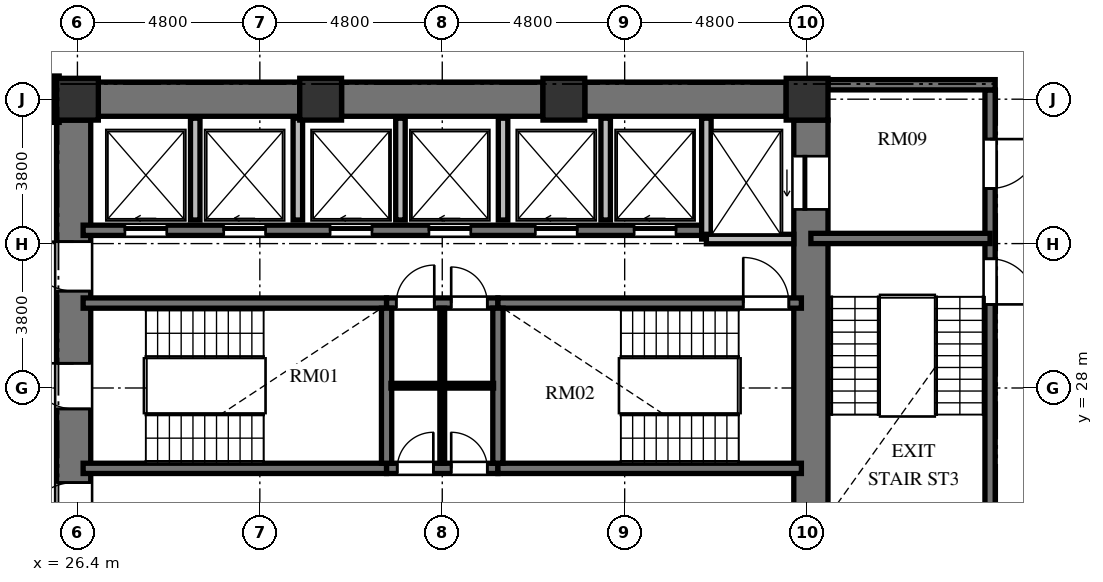
"""IFC4 building model, lengths in metres.
Left out: names, types, materials, properties, quantities, classifications, styles, units other than length and angle.
Written with IfcOpenShell. Run it as: python <this file> out.ifc"""

import sys

from ifc_helpers import new_model, si_unit, direction, frame, frame_2d, origin, origin_2d, place, context, subcontext, project, spatial, rectangle, extrude, element, fill, save


model = new_model("IFC4")
c1 = context("Model", 3, precision=1e-05, world=origin(), true_north=direction((0.0, 1.0)))
c2 = subcontext(c1, "Body", "Model", "MODEL_VIEW")
j1 = project(units=[si_unit("LENGTHUNIT", "METRE"), si_unit("PLANEANGLEUNIT", "RADIAN")], contexts=[c1])
p1 = place(None, origin())
s1 = spatial("IfcSite", under=j1, at=p1, CompositionType="ELEMENT")
p2 = place(p1, origin())
s2 = spatial("IfcBuilding", under=s1, at=p2, CompositionType="ELEMENT")
p3 = place(p2, frame((0.0, 0.0, 43.44)))
s3 = spatial("IfcBuildingStorey", under=s2, at=p3, CompositionType="ELEMENT", Elevation=43.44)
for number, where, z_axis, x_axis in (
    (1, (45.6, 35.6, 0.0), (0.0, 0.0, 1.0), (1.0, 0.0, 0.0)),
    (2, (39.2, 35.6, 0.0), (0.0, 0.0, 1.0), (1.0, 0.0, 0.0)),
    (3, (32.8, 35.6, 0.0), (0.0, 0.0, 1.0), (1.0, 0.0, 0.0)),
    (4, (26.4, 35.6, 0.0), (0.0, 0.0, 1.0), (1.0, 0.0, 0.0)),
):
    element("IfcColumn", number, at=place(p3, frame(where, z_axis=z_axis, x_axis=x_axis)), inside=s3, PredefinedType="COLUMN", context=c2, shape_type="SweptSolid", body=[
        extrude(rectangle(XDim=1.1, YDim=1.1, at=origin_2d()), origin(), (0.0, 0.0, 1.0), 3.648),
    ])
p4 = place(p3, frame((26.3, 20.95, 0.0), z_axis=(0.0, 0.0, 1.0), x_axis=(0.0, 1.0, 0.0)))
e5 = element("IfcWall", 5, at=p4, inside=s3, PredefinedType="SHEAR", context=c2, shape_type="SweptSolid", body=[
    extrude(rectangle(XDim=14.1, YDim=0.9, at=frame_2d((7.05, 0.0))), origin(), (0.0, 0.0, 1.0), 3.648),
])
p5 = place(p4, frame((6.5, 0.0, 0.0)))
e6 = element("IfcOpeningElement", 6, at=p5, cuts=e5, PredefinedType="OPENING", context=c2, shape_type="SweptSolid", body=[
    extrude(rectangle(XDim=1.2, YDim=2.15, at=frame_2d((0.6, 1.075))), frame((0.0, 0.46, 0.0), z_axis=(0.0, -1.0, 0.0), x_axis=(1.0, 0.0, 0.0)), (0.0, 0.0, 1.0), 0.92),
])
p6 = place(p4, frame((9.6, 0.0, 0.0)))
e7 = element("IfcOpeningElement", 7, at=p6, cuts=e5, PredefinedType="OPENING", context=c2, shape_type="SweptSolid", body=[
    extrude(rectangle(XDim=1.3, YDim=2.2, at=frame_2d((0.65, 1.1))), frame((0.0, 0.46, 0.0), z_axis=(0.0, -1.0, 0.0), x_axis=(1.0, 0.0, 0.0)), (0.0, 0.0, 1.0), 0.92),
])
p7 = place(p4, frame((3.26, 0.0, 0.0)))
e8 = element("IfcOpeningElement", 8, at=p7, cuts=e5, PredefinedType="OPENING", context=c2, shape_type="SweptSolid", body=[
    extrude(rectangle(XDim=1.3, YDim=2.2, at=frame_2d((0.65, 1.1))), frame((0.0, 0.46, 0.0), z_axis=(0.0, -1.0, 0.0), x_axis=(1.0, 0.0, 0.0)), (0.0, 0.0, 1.0), 0.92),
])
p8 = place(p3, frame((45.7, 20.95, 0.0), z_axis=(0.0, 0.0, 1.0), x_axis=(0.0, 1.0, 0.0)))
e9 = element("IfcWall", 9, at=p8, inside=s3, PredefinedType="SHEAR", context=c2, shape_type="SweptSolid", body=[
    extrude(rectangle(XDim=14.1, YDim=0.9, at=frame_2d((7.05, 0.0))), origin(), (0.0, 0.0, 1.0), 3.648),
])
p9 = place(p8, frame((11.75, 0.0, 0.0)))
e10 = element("IfcOpeningElement", 10, at=p9, cuts=e9, PredefinedType="OPENING", context=c2, shape_type="SweptSolid", body=[
    extrude(rectangle(XDim=1.4, YDim=2.3, at=frame_2d((0.7, 1.15))), frame((0.0, 0.46, 0.0), z_axis=(0.0, -1.0, 0.0), x_axis=(1.0, 0.0, 0.0)), (0.0, 0.0, 1.0), 0.92),
])
p10 = place(p8, frame((0.95, 0.0, 0.0)))
e11 = element("IfcOpeningElement", 11, at=p10, cuts=e9, PredefinedType="OPENING", context=c2, shape_type="SweptSolid", body=[
    extrude(rectangle(XDim=1.4, YDim=2.3, at=frame_2d((0.7, 1.15))), frame((0.0, 0.46, 0.0), z_axis=(0.0, -1.0, 0.0), x_axis=(1.0, 0.0, 0.0)), (0.0, 0.0, 1.0), 0.92),
])
p11 = place(p3, frame((26.95, 35.6, 0.0), z_axis=(0.0, 0.0, 1.0), x_axis=(1.0, 0.0, 0.0)))
e12 = element("IfcWall", 12, at=p11, inside=s3, PredefinedType="SHEAR", context=c2, shape_type="SweptSolid", body=[
    extrude(rectangle(XDim=5.3, YDim=0.9, at=frame_2d((2.65, 0.0))), origin(), (0.0, 0.0, 1.0), 3.648),
])
p12 = place(p3, frame((33.35, 35.6, 0.0), z_axis=(0.0, 0.0, 1.0), x_axis=(1.0, 0.0, 0.0)))
e13 = element("IfcWall", 13, at=p12, inside=s3, PredefinedType="SHEAR", context=c2, shape_type="SweptSolid", body=[
    extrude(rectangle(XDim=5.3, YDim=0.9, at=frame_2d((2.65, 0.0))), origin(), (0.0, 0.0, 1.0), 3.648),
])
p13 = place(p3, frame((39.75, 35.6, 0.0), z_axis=(0.0, 0.0, 1.0), x_axis=(1.0, 0.0, 0.0)))
e14 = element("IfcWall", 14, at=p13, inside=s3, PredefinedType="SHEAR", context=c2, shape_type="SweptSolid", body=[
    extrude(rectangle(XDim=5.3, YDim=0.9, at=frame_2d((2.65, 0.0))), origin(), (0.0, 0.0, 1.0), 3.648),
])
p14 = place(p3, frame((26.55, 30.235, 0.0), z_axis=(0.0, 0.0, 1.0), x_axis=(1.0, 0.0, 0.0)))
e15 = element("IfcWall", 15, at=p14, inside=s3, PredefinedType="SHEAR", context=c2, shape_type="SweptSolid", body=[
    extrude(rectangle(XDim=7.985, YDim=0.27, at=frame_2d((3.992, 0.0))), origin(), (0.0, 0.0, 1.0), 3.648),
])
p15 = place(p3, frame((34.535, 30.235, 0.0), z_axis=(0.0, 0.0, 1.0), x_axis=(1.0, 0.0, 0.0)))
e16 = element("IfcWall", 16, at=p15, inside=s3, PredefinedType="SHEAR", context=c2, shape_type="SweptSolid", body=[
    extrude(rectangle(XDim=2.93, YDim=0.27, at=frame_2d((1.465, 0.0))), origin(), (0.0, 0.0, 1.0), 3.648),
])
p16 = place(p15, frame((0.255, 0.0, 0.0)))
e17 = element("IfcOpeningElement", 17, at=p16, cuts=e16, PredefinedType="OPENING", context=c2, shape_type="SweptSolid", body=[
    extrude(rectangle(XDim=1.0, YDim=2.1, at=frame_2d((0.5, 1.05))), frame((0.0, 0.145, 0.0), z_axis=(0.0, -1.0, 0.0), x_axis=(1.0, 0.0, 0.0)), (0.0, 0.0, 1.0), 0.29),
])
p17 = place(p15, frame((1.7, 0.0, 0.0)))
e18 = element("IfcOpeningElement", 18, at=p17, cuts=e16, PredefinedType="OPENING", context=c2, shape_type="SweptSolid", body=[
    extrude(rectangle(XDim=0.95, YDim=2.1, at=frame_2d((0.475, 1.05))), frame((0.0, 0.145, 0.0), z_axis=(0.0, -1.0, 0.0), x_axis=(1.0, 0.0, 0.0)), (0.0, 0.0, 1.0), 0.29),
])
p18 = place(p3, frame((37.465, 30.235, 0.0), z_axis=(0.0, 0.0, 1.0), x_axis=(1.0, 0.0, 0.0)))
e19 = element("IfcWall", 19, at=p18, inside=s3, PredefinedType="SHEAR", context=c2, shape_type="SweptSolid", body=[
    extrude(rectangle(XDim=7.985, YDim=0.27, at=frame_2d((3.992, 0.0))), origin(), (0.0, 0.0, 1.0), 3.648),
])
p19 = place(p18, frame((6.455, 0.0, 0.0)))
e20 = element("IfcOpeningElement", 20, at=p19, cuts=e19, PredefinedType="OPENING", context=c2, shape_type="SweptSolid", body=[
    extrude(rectangle(XDim=1.2, YDim=2.15, at=frame_2d((0.6, 1.075))), frame((0.0, 0.145, 0.0), z_axis=(0.0, -1.0, 0.0), x_axis=(1.0, 0.0, 0.0)), (0.0, 0.0, 1.0), 0.29),
])
p20 = place(p3, frame((26.55, 25.885, 0.0), z_axis=(0.0, 0.0, 1.0), x_axis=(1.0, 0.0, 0.0)))
e21 = element("IfcWall", 21, at=p20, inside=s3, PredefinedType="SHEAR", context=c2, shape_type="SweptSolid", body=[
    extrude(rectangle(XDim=7.985, YDim=0.27, at=frame_2d((3.992, 0.0))), origin(), (0.0, 0.0, 1.0), 3.648),
])
p21 = place(p3, frame((34.535, 25.885, 0.0), z_axis=(0.0, 0.0, 1.0), x_axis=(1.0, 0.0, 0.0)))
e22 = element("IfcWall", 22, at=p21, inside=s3, PredefinedType="SHEAR", context=c2, shape_type="SweptSolid", body=[
    extrude(rectangle(XDim=2.93, YDim=0.27, at=frame_2d((1.465, 0.0))), origin(), (0.0, 0.0, 1.0), 3.648),
])
p22 = place(p21, frame((0.28, 0.0, 0.0)))
e23 = element("IfcOpeningElement", 23, at=p22, cuts=e22, PredefinedType="OPENING", context=c2, shape_type="SweptSolid", body=[
    extrude(rectangle(XDim=0.95, YDim=2.1, at=frame_2d((0.475, 1.05))), frame((0.0, 0.145, 0.0), z_axis=(0.0, -1.0, 0.0), x_axis=(1.0, 0.0, 0.0)), (0.0, 0.0, 1.0), 0.29),
])
p23 = place(p21, frame((1.7, 0.0, 0.0)))
e24 = element("IfcOpeningElement", 24, at=p23, cuts=e22, PredefinedType="OPENING", context=c2, shape_type="SweptSolid", body=[
    extrude(rectangle(XDim=0.95, YDim=2.1, at=frame_2d((0.475, 1.05))), frame((0.0, 0.145, 0.0), z_axis=(0.0, -1.0, 0.0), x_axis=(1.0, 0.0, 0.0)), (0.0, 0.0, 1.0), 0.29),
])
p24 = place(p3, frame((37.465, 25.885, 0.0), z_axis=(0.0, 0.0, 1.0), x_axis=(1.0, 0.0, 0.0)))
e25 = element("IfcWall", 25, at=p24, inside=s3, PredefinedType="SHEAR", context=c2, shape_type="SweptSolid", body=[
    extrude(rectangle(XDim=7.985, YDim=0.27, at=frame_2d((3.992, 0.0))), origin(), (0.0, 0.0, 1.0), 3.648),
])
for number, where, z_axis, x_axis in (
    (26, (34.535, 26.02, 0.0), (0.0, 0.0, 1.0), (0.0, 1.0, 0.0)),
    (27, (37.465, 26.02, 0.0), (0.0, 0.0, 1.0), (0.0, 1.0, 0.0)),
):
    element("IfcWall", number, at=place(p3, frame(where, z_axis=z_axis, x_axis=x_axis)), inside=s3, PredefinedType="SHEAR", context=c2, shape_type="SweptSolid", body=[
        extrude(rectangle(XDim=4.08, YDim=0.27, at=frame_2d((2.04, 0.0))), origin(), (0.0, 0.0, 1.0), 3.648),
    ])
p25 = place(p3, frame((34.65, 28.06, 0.0), z_axis=(0.0, 0.0, 1.0), x_axis=(1.0, 0.0, 0.0)))
e28 = element("IfcWall", 28, at=p25, inside=s3, PredefinedType="PARTITIONING", context=c2, shape_type="SweptSolid", body=[
    extrude(rectangle(XDim=2.7, YDim=0.125, at=frame_2d((1.35, 0.0))), origin(), (0.0, 0.0, 1.0), 3.428),
])
p26 = place(p3, frame((36.0, 26.02, 0.0), z_axis=(0.0, 0.0, 1.0), x_axis=(0.0, 1.0, 0.0)))
e29 = element("IfcWall", 29, at=p26, inside=s3, PredefinedType="PARTITIONING", context=c2, shape_type="SweptSolid", body=[
    extrude(rectangle(XDim=4.08, YDim=0.125, at=frame_2d((2.04, 0.0))), origin(), (0.0, 0.0, 1.0), 3.428),
])
p27 = place(p3, frame((26.55, 32.15, 0.0), z_axis=(0.0, 0.0, 1.0), x_axis=(1.0, 0.0, 0.0)))
e30 = element("IfcWall", 30, at=p27, inside=s3, PredefinedType="SHEAR", context=c2, shape_type="SweptSolid", body=[
    extrude(rectangle(XDim=16.4, YDim=0.27, at=frame_2d((8.2, 0.0))), origin(), (0.0, 0.0, 1.0), 3.648),
])
p28 = place(p27, frame((1.1, 0.0, 0.0)))
e31 = element("IfcOpeningElement", 31, at=p28, cuts=e30, PredefinedType="OPENING", context=c2, shape_type="SweptSolid", body=[
    extrude(rectangle(XDim=1.1, YDim=2.2, at=frame_2d((0.55, 1.1))), frame((0.0, 0.145, 0.0), z_axis=(0.0, -1.0, 0.0), x_axis=(1.0, 0.0, 0.0)), (0.0, 0.0, 1.0), 0.29),
])
p29 = place(p27, frame((3.7, 0.0, 0.0)))
e32 = element("IfcOpeningElement", 32, at=p29, cuts=e30, PredefinedType="OPENING", context=c2, shape_type="SweptSolid", body=[
    extrude(rectangle(XDim=1.1, YDim=2.2, at=frame_2d((0.55, 1.1))), frame((0.0, 0.145, 0.0), z_axis=(0.0, -1.0, 0.0), x_axis=(1.0, 0.0, 0.0)), (0.0, 0.0, 1.0), 0.29),
])
p30 = place(p27, frame((6.5, 0.0, 0.0)))
e33 = element("IfcOpeningElement", 33, at=p30, cuts=e30, PredefinedType="OPENING", context=c2, shape_type="SweptSolid", body=[
    extrude(rectangle(XDim=1.1, YDim=2.2, at=frame_2d((0.55, 1.1))), frame((0.0, 0.145, 0.0), z_axis=(0.0, -1.0, 0.0), x_axis=(1.0, 0.0, 0.0)), (0.0, 0.0, 1.0), 0.29),
])
p31 = place(p27, frame((9.1, 0.0, 0.0)))
e34 = element("IfcOpeningElement", 34, at=p31, cuts=e30, PredefinedType="OPENING", context=c2, shape_type="SweptSolid", body=[
    extrude(rectangle(XDim=1.1, YDim=2.2, at=frame_2d((0.55, 1.1))), frame((0.0, 0.145, 0.0), z_axis=(0.0, -1.0, 0.0), x_axis=(1.0, 0.0, 0.0)), (0.0, 0.0, 1.0), 0.29),
])
p32 = place(p27, frame((11.9, 0.0, 0.0)))
e35 = element("IfcOpeningElement", 35, at=p32, cuts=e30, PredefinedType="OPENING", context=c2, shape_type="SweptSolid", body=[
    extrude(rectangle(XDim=1.1, YDim=2.2, at=frame_2d((0.55, 1.1))), frame((0.0, 0.145, 0.0), z_axis=(0.0, -1.0, 0.0), x_axis=(1.0, 0.0, 0.0)), (0.0, 0.0, 1.0), 0.29),
])
p33 = place(p27, frame((14.5, 0.0, 0.0)))
e36 = element("IfcOpeningElement", 36, at=p33, cuts=e30, PredefinedType="OPENING", context=c2, shape_type="SweptSolid", body=[
    extrude(rectangle(XDim=1.1, YDim=2.2, at=frame_2d((0.55, 1.1))), frame((0.0, 0.145, 0.0), z_axis=(0.0, -1.0, 0.0), x_axis=(1.0, 0.0, 0.0)), (0.0, 0.0, 1.0), 0.29),
])
p34 = place(p3, frame((42.95, 31.92, 0.0), z_axis=(0.0, 0.0, 1.0), x_axis=(0.0, 1.0, 0.0)))
e37 = element("IfcWall", 37, at=p34, inside=s3, PredefinedType="SOLIDWALL", context=c2, shape_type="SweptSolid", body=[
    extrude(rectangle(XDim=3.18, YDim=0.25, at=frame_2d((1.59, 0.0))), origin(), (0.0, 0.0, 1.0), 3.428),
])
p35 = place(p3, frame((42.95, 31.92, 0.0), z_axis=(0.0, 0.0, 1.0), x_axis=(1.0, 0.0, 0.0)))
e38 = element("IfcWall", 38, at=p35, inside=s3, PredefinedType="SOLIDWALL", context=c2, shape_type="SweptSolid", body=[
    extrude(rectangle(XDim=2.3, YDim=0.25, at=frame_2d((1.15, 0.0))), origin(), (0.0, 0.0, 1.0), 3.428),
])
for number, where, z_axis, x_axis in (
    (39, (29.5, 32.42, 0.0), (0.0, 0.0, 1.0), (0.0, 1.0, 0.0)),
    (40, (32.2, 32.42, 0.0), (0.0, 0.0, 1.0), (0.0, 1.0, 0.0)),
    (41, (34.9, 32.42, 0.0), (0.0, 0.0, 1.0), (0.0, 1.0, 0.0)),
    (42, (37.6, 32.42, 0.0), (0.0, 0.0, 1.0), (0.0, 1.0, 0.0)),
    (43, (40.3, 32.42, 0.0), (0.0, 0.0, 1.0), (0.0, 1.0, 0.0)),
):
    element("IfcWall", number, at=place(p3, frame(where, z_axis=z_axis, x_axis=x_axis)), inside=s3, PredefinedType="SOLIDWALL", context=c2, shape_type="SweptSolid", body=[
        extrude(rectangle(XDim=2.68, YDim=0.25, at=frame_2d((1.34, 0.0))), origin(), (0.0, 0.0, 1.0), 3.428),
    ])
p36 = place(p3, frame((50.415, 35.845, 0.0), z_axis=(0.0, 0.0, 1.0), x_axis=(0.0, -1.0, 0.0)))
e44 = element("IfcWall", 44, at=p36, inside=s3, PredefinedType="SHEAR", context=c2, shape_type="SweptSolid", body=[
    extrude(rectangle(XDim=15.825, YDim=0.27, at=frame_2d((7.913, 0.0))), origin(), (0.0, 0.0, 1.0), 3.648),
])
p37 = place(p36, frame((4.445, 0.0, 0.0)))
e45 = element("IfcOpeningElement", 45, at=p37, cuts=e44, PredefinedType="OPENING", context=c2, shape_type="SweptSolid", body=[
    extrude(rectangle(XDim=1.2, YDim=2.15, at=frame_2d((0.6, 1.075))), frame((0.0, 0.145, 0.0), z_axis=(0.0, -1.0, 0.0), x_axis=(1.0, 0.0, 0.0)), (0.0, 0.0, 1.0), 0.29),
])
p38 = place(p36, frame((1.295, 0.0, 0.0)))
e46 = element("IfcOpeningElement", 46, at=p38, cuts=e44, PredefinedType="OPENING", context=c2, shape_type="SweptSolid", body=[
    extrude(rectangle(XDim=1.3, YDim=2.2, at=frame_2d((0.65, 1.1))), frame((0.0, 0.145, 0.0), z_axis=(0.0, -1.0, 0.0), x_axis=(1.0, 0.0, 0.0)), (0.0, 0.0, 1.0), 0.29),
])
p39 = place(p36, frame((13.095, 0.0, 0.0)))
e47 = element("IfcOpeningElement", 47, at=p39, cuts=e44, PredefinedType="OPENING", context=c2, shape_type="SweptSolid", body=[
    extrude(rectangle(XDim=1.3, YDim=2.2, at=frame_2d((0.65, 1.1))), frame((0.0, 0.145, 0.0), z_axis=(0.0, -1.0, 0.0), x_axis=(1.0, 0.0, 0.0)), (0.0, 0.0, 1.0), 0.29),
])
p40 = place(p3, frame((46.15, 35.98, 0.0), z_axis=(0.0, 0.0, 1.0), x_axis=(1.0, 0.0, 0.0)))
e48 = element("IfcWall", 48, at=p40, inside=s3, PredefinedType="SHEAR", context=c2, shape_type="SweptSolid", body=[
    extrude(rectangle(XDim=4.4, YDim=0.27, at=frame_2d((2.2, 0.0))), origin(), (0.0, 0.0, 1.0), 3.648),
])
p41 = place(p3, frame((45.7, 31.935, 0.0), z_axis=(0.0, 0.0, 1.0), x_axis=(1.0, 0.0, 0.0)))
e49 = element("IfcWall", 49, at=p41, inside=s3, PredefinedType="SHEAR", context=c2, shape_type="SweptSolid", body=[
    extrude(rectangle(XDim=4.715, YDim=0.27, at=frame_2d((2.357, 0.0))), origin(), (0.0, 0.0, 1.0), 3.648),
])
p42 = place(p3, frame((25.83, 36.21, 0.0), z_axis=(0.0, 0.0, 1.0), x_axis=(0.0, -1.0, 0.0)))
e50 = element("IfcWall", 50, at=p42, inside=s3, PredefinedType="PARTITIONING", context=c2, shape_type="SweptSolid", body=[
    extrude(rectangle(XDim=1.22, YDim=0.18, at=frame_2d((0.61, 0.0))), origin(), (0.0, 0.0, 1.0), 3.428),
])
p43 = place(p5, origin())
e51 = element("IfcDoor", 51, at=p43, inside=s3, OperationType="SINGLE_SWING_RIGHT", PredefinedType="DOOR", context=c2, shape_type="SweptSolid", body=[
    extrude(rectangle(XDim=1.2, YDim=2.15, at=frame_2d((0.6, 1.075))), frame((0.0, 0.025, 0.0), z_axis=(0.0, -1.0, 0.0), x_axis=(1.0, 0.0, 0.0)), (0.0, 0.0, 1.0), 0.05),
])
fill(e6, e51)
p44 = place(p19, origin())
e52 = element("IfcDoor", 52, at=p44, inside=s3, OperationType="SINGLE_SWING_LEFT", PredefinedType="DOOR", context=c2, shape_type="SweptSolid", body=[
    extrude(rectangle(XDim=1.2, YDim=2.15, at=frame_2d((0.6, 1.075))), frame((0.0, 0.025, 0.0), z_axis=(0.0, -1.0, 0.0), x_axis=(1.0, 0.0, 0.0)), (0.0, 0.0, 1.0), 0.05),
])
fill(e20, e52)
p45 = place(p22, origin())
e53 = element("IfcDoor", 53, at=p45, inside=s3, OperationType="SINGLE_SWING_RIGHT", PredefinedType="DOOR", context=c2, shape_type="SweptSolid", body=[
    extrude(rectangle(XDim=0.95, YDim=2.1, at=frame_2d((0.475, 1.05))), frame((0.0, 0.025, 0.0), z_axis=(0.0, -1.0, 0.0), x_axis=(1.0, 0.0, 0.0)), (0.0, 0.0, 1.0), 0.05),
])
fill(e23, e53)
p46 = place(p23, origin())
e54 = element("IfcDoor", 54, at=p46, inside=s3, OperationType="SINGLE_SWING_LEFT", PredefinedType="DOOR", context=c2, shape_type="SweptSolid", body=[
    extrude(rectangle(XDim=0.95, YDim=2.1, at=frame_2d((0.475, 1.05))), frame((0.0, 0.025, 0.0), z_axis=(0.0, -1.0, 0.0), x_axis=(1.0, 0.0, 0.0)), (0.0, 0.0, 1.0), 0.05),
])
fill(e24, e54)
p47 = place(p16, origin())
e55 = element("IfcDoor", 55, at=p47, inside=s3, OperationType="SINGLE_SWING_RIGHT", PredefinedType="DOOR", context=c2, shape_type="SweptSolid", body=[
    extrude(rectangle(XDim=1.0, YDim=2.1, at=frame_2d((0.5, 1.05))), frame((0.0, 0.025, 0.0), z_axis=(0.0, -1.0, 0.0), x_axis=(1.0, 0.0, 0.0)), (0.0, 0.0, 1.0), 0.05),
])
fill(e17, e55)
p48 = place(p17, origin())
e56 = element("IfcDoor", 56, at=p48, inside=s3, OperationType="SINGLE_SWING_LEFT", PredefinedType="DOOR", context=c2, shape_type="SweptSolid", body=[
    extrude(rectangle(XDim=0.95, YDim=2.1, at=frame_2d((0.475, 1.05))), frame((0.0, 0.025, 0.0), z_axis=(0.0, -1.0, 0.0), x_axis=(1.0, 0.0, 0.0)), (0.0, 0.0, 1.0), 0.05),
])
fill(e18, e56)
p49 = place(p6, origin())
e57 = element("IfcDoor", 57, at=p49, inside=s3, OperationType="SINGLE_SWING_RIGHT", PredefinedType="DOOR", context=c2, shape_type="SweptSolid", body=[
    extrude(rectangle(XDim=1.3, YDim=2.2, at=frame_2d((0.65, 1.1))), frame((0.0, 0.025, 0.0), z_axis=(0.0, -1.0, 0.0), x_axis=(1.0, 0.0, 0.0)), (0.0, 0.0, 1.0), 0.05),
])
fill(e7, e57)
p50 = place(p7, origin())
e58 = element("IfcDoor", 58, at=p50, inside=s3, OperationType="SINGLE_SWING_LEFT", PredefinedType="DOOR", context=c2, shape_type="SweptSolid", body=[
    extrude(rectangle(XDim=1.3, YDim=2.2, at=frame_2d((0.65, 1.1))), frame((0.0, 0.025, 0.0), z_axis=(0.0, -1.0, 0.0), x_axis=(1.0, 0.0, 0.0)), (0.0, 0.0, 1.0), 0.05),
])
fill(e8, e58)
p51 = place(p28, origin())
e59 = element("IfcDoor", 59, at=p51, inside=s3, OperationType="SLIDING_TO_LEFT", PredefinedType="DOOR", context=c2, shape_type="SweptSolid", body=[
    extrude(rectangle(XDim=1.1, YDim=2.2, at=frame_2d((0.55, 1.1))), frame((0.0, 0.025, 0.0), z_axis=(0.0, -1.0, 0.0), x_axis=(1.0, 0.0, 0.0)), (0.0, 0.0, 1.0), 0.05),
])
fill(e31, e59)
p52 = place(p29, origin())
e60 = element("IfcDoor", 60, at=p52, inside=s3, OperationType="SLIDING_TO_LEFT", PredefinedType="DOOR", context=c2, shape_type="SweptSolid", body=[
    extrude(rectangle(XDim=1.1, YDim=2.2, at=frame_2d((0.55, 1.1))), frame((0.0, 0.025, 0.0), z_axis=(0.0, -1.0, 0.0), x_axis=(1.0, 0.0, 0.0)), (0.0, 0.0, 1.0), 0.05),
])
fill(e32, e60)
p53 = place(p30, origin())
e61 = element("IfcDoor", 61, at=p53, inside=s3, OperationType="SLIDING_TO_LEFT", PredefinedType="DOOR", context=c2, shape_type="SweptSolid", body=[
    extrude(rectangle(XDim=1.1, YDim=2.2, at=frame_2d((0.55, 1.1))), frame((0.0, 0.025, 0.0), z_axis=(0.0, -1.0, 0.0), x_axis=(1.0, 0.0, 0.0)), (0.0, 0.0, 1.0), 0.05),
])
fill(e33, e61)
p54 = place(p31, origin())
e62 = element("IfcDoor", 62, at=p54, inside=s3, OperationType="SLIDING_TO_LEFT", PredefinedType="DOOR", context=c2, shape_type="SweptSolid", body=[
    extrude(rectangle(XDim=1.1, YDim=2.2, at=frame_2d((0.55, 1.1))), frame((0.0, 0.025, 0.0), z_axis=(0.0, -1.0, 0.0), x_axis=(1.0, 0.0, 0.0)), (0.0, 0.0, 1.0), 0.05),
])
fill(e34, e62)
p55 = place(p32, origin())
e63 = element("IfcDoor", 63, at=p55, inside=s3, OperationType="SLIDING_TO_LEFT", PredefinedType="DOOR", context=c2, shape_type="SweptSolid", body=[
    extrude(rectangle(XDim=1.1, YDim=2.2, at=frame_2d((0.55, 1.1))), frame((0.0, 0.025, 0.0), z_axis=(0.0, -1.0, 0.0), x_axis=(1.0, 0.0, 0.0)), (0.0, 0.0, 1.0), 0.05),
])
fill(e35, e63)
p56 = place(p33, origin())
e64 = element("IfcDoor", 64, at=p56, inside=s3, OperationType="SLIDING_TO_LEFT", PredefinedType="DOOR", context=c2, shape_type="SweptSolid", body=[
    extrude(rectangle(XDim=1.1, YDim=2.2, at=frame_2d((0.55, 1.1))), frame((0.0, 0.025, 0.0), z_axis=(0.0, -1.0, 0.0), x_axis=(1.0, 0.0, 0.0)), (0.0, 0.0, 1.0), 0.05),
])
fill(e36, e64)
p57 = place(p9, origin())
e65 = element("IfcDoor", 65, at=p57, inside=s3, OperationType="SLIDING_TO_LEFT", PredefinedType="DOOR", context=c2, shape_type="SweptSolid", body=[
    extrude(rectangle(XDim=1.4, YDim=2.3, at=frame_2d((0.7, 1.15))), frame((0.0, 0.025, 0.0), z_axis=(0.0, -1.0, 0.0), x_axis=(1.0, 0.0, 0.0)), (0.0, 0.0, 1.0), 0.05),
])
fill(e10, e65)
p58 = place(p37, origin())
e66 = element("IfcDoor", 66, at=p58, inside=s3, OperationType="SINGLE_SWING_RIGHT", PredefinedType="DOOR", context=c2, shape_type="SweptSolid", body=[
    extrude(rectangle(XDim=1.2, YDim=2.15, at=frame_2d((0.6, 1.075))), frame((0.0, 0.025, 0.0), z_axis=(0.0, -1.0, 0.0), x_axis=(1.0, 0.0, 0.0)), (0.0, 0.0, 1.0), 0.05),
])
fill(e45, e66)
p59 = place(p38, origin())
e67 = element("IfcDoor", 67, at=p59, inside=s3, OperationType="SINGLE_SWING_LEFT", PredefinedType="DOOR", context=c2, shape_type="SweptSolid", body=[
    extrude(rectangle(XDim=1.3, YDim=2.2, at=frame_2d((0.65, 1.1))), frame((0.0, 0.025, 0.0), z_axis=(0.0, -1.0, 0.0), x_axis=(1.0, 0.0, 0.0)), (0.0, 0.0, 1.0), 0.05),
])
fill(e46, e67)
save(model, sys.argv[1])
